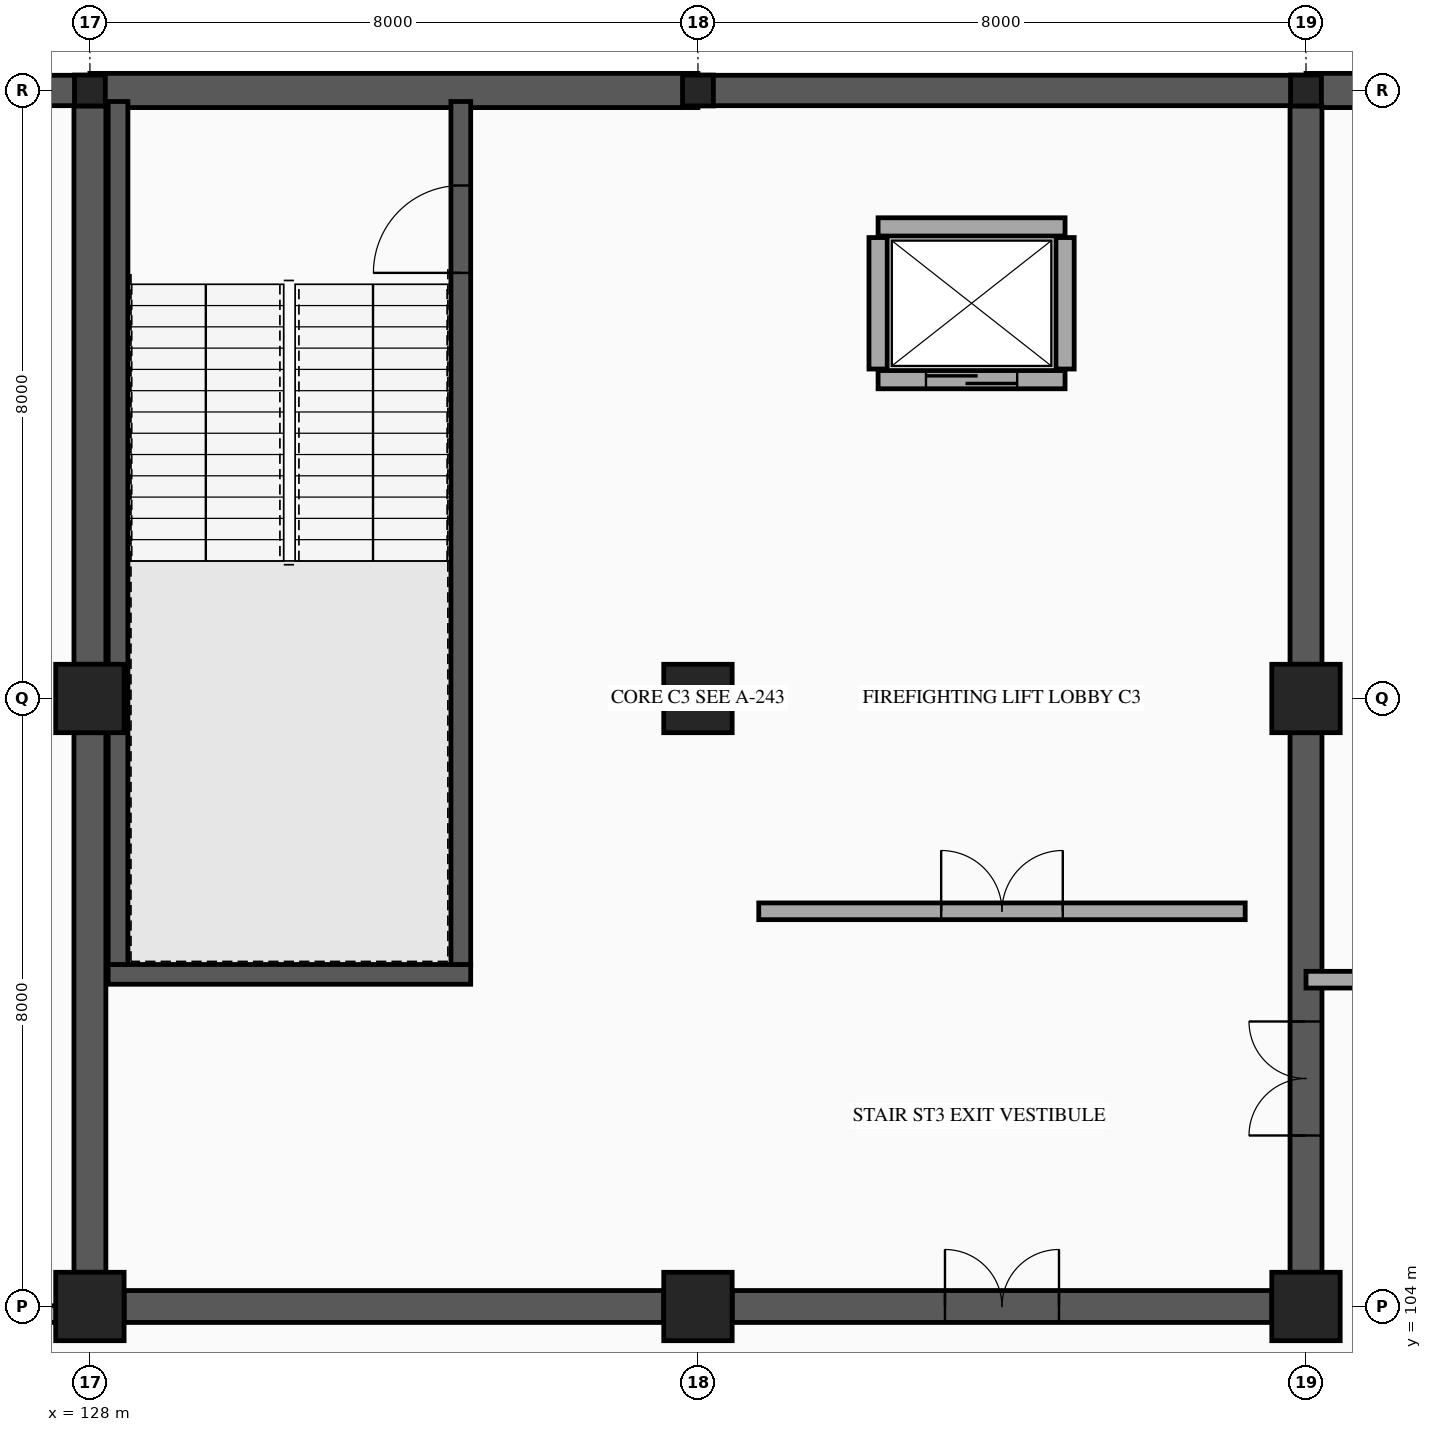
"""IFC4 building model, lengths in metres.
Left out: names, types, materials, properties, quantities, classifications, styles, units other than length and angle.
Written with IfcOpenShell. Run it as: python <this file> out.ifc"""

import sys

from ifc_helpers import new_model, si_unit, direction, frame, frame_2d, origin, origin_2d, place, context, subcontext, project, spatial, rectangle, hollow_rectangle, extrude, element, fill, save


model = new_model("IFC4")
c1 = context("Model", 3, precision=1e-05, world=origin(), true_north=direction((0.0, 1.0)))
c2 = subcontext(c1, "Body", "Model", "MODEL_VIEW")
j1 = project(units=[si_unit("LENGTHUNIT", "METRE"), si_unit("PLANEANGLEUNIT", "RADIAN")], contexts=[c1])
p1 = place(None, origin())
s1 = spatial("IfcSite", under=j1, at=p1, CompositionType="ELEMENT")
p2 = place(p1, origin())
s2 = spatial("IfcBuilding", under=s1, at=p2, CompositionType="ELEMENT")
p3 = place(p2, frame((0.0, 0.0, -4.8)))
s3 = spatial("IfcBuildingStorey", under=s2, at=p3, CompositionType="ELEMENT", Elevation=-4.8)
for number, where, z_axis, x_axis in (
    (1, (128.0, 104.0, 0.0), (0.0, 0.0, 1.0), (1.0, 0.0, 0.0)),
    (2, (128.0, 112.0, 0.0), (0.0, 0.0, 1.0), (1.0, 0.0, 0.0)),
):
    element("IfcColumn", number, at=place(p3, frame(where, z_axis=z_axis, x_axis=x_axis)), inside=s3, PredefinedType="COLUMN", context=c2, shape_type="SweptSolid", body=[
        extrude(rectangle(XDim=0.9, YDim=0.9, at=origin_2d()), origin(), (0.0, 0.0, 1.0), 4.8),
    ])
p4 = place(p3, frame((128.0, 120.0, 0.0), z_axis=(0.0, 0.0, 1.0), x_axis=(1.0, 0.0, 0.0)))
e3 = element("IfcColumn", 3, at=p4, inside=s3, PredefinedType="COLUMN", context=c2, shape_type="SweptSolid", body=[
    extrude(hollow_rectangle(XDim=0.406, YDim=0.406, WallThickness=0.015, InnerFilletRadius=0.015, OuterFilletRadius=0.029, at=origin_2d()), origin(), (0.0, 0.0, 1.0), 4.8),
])
for number, where, z_axis, x_axis in (
    (4, (136.0, 104.0, 0.0), (0.0, 0.0, 1.0), (1.0, 0.0, 0.0)),
    (5, (136.0, 112.0, 0.0), (0.0, 0.0, 1.0), (1.0, 0.0, 0.0)),
):
    element("IfcColumn", number, at=place(p3, frame(where, z_axis=z_axis, x_axis=x_axis)), inside=s3, PredefinedType="COLUMN", context=c2, shape_type="SweptSolid", body=[
        extrude(rectangle(XDim=0.9, YDim=0.9, at=origin_2d()), origin(), (0.0, 0.0, 1.0), 4.8),
    ])
p5 = place(p3, frame((136.0, 120.0, 0.0), z_axis=(0.0, 0.0, 1.0), x_axis=(1.0, 0.0, 0.0)))
e6 = element("IfcColumn", 6, at=p5, inside=s3, PredefinedType="COLUMN", context=c2, shape_type="SweptSolid", body=[
    extrude(hollow_rectangle(XDim=0.406, YDim=0.406, WallThickness=0.015, InnerFilletRadius=0.015, OuterFilletRadius=0.029, at=origin_2d()), origin(), (0.0, 0.0, 1.0), 4.8),
])
for number, where, z_axis, x_axis in (
    (7, (144.0, 104.0, 0.0), (0.0, 0.0, 1.0), (1.0, 0.0, 0.0)),
    (8, (144.0, 112.0, 0.0), (0.0, 0.0, 1.0), (1.0, 0.0, 0.0)),
):
    element("IfcColumn", number, at=place(p3, frame(where, z_axis=z_axis, x_axis=x_axis)), inside=s3, PredefinedType="COLUMN", context=c2, shape_type="SweptSolid", body=[
        extrude(rectangle(XDim=0.9, YDim=0.9, at=origin_2d()), origin(), (0.0, 0.0, 1.0), 4.8),
    ])
p6 = place(p3, frame((144.0, 120.0, 0.0), z_axis=(0.0, 0.0, 1.0), x_axis=(1.0, 0.0, 0.0)))
e9 = element("IfcColumn", 9, at=p6, inside=s3, PredefinedType="COLUMN", context=c2, shape_type="SweptSolid", body=[
    extrude(hollow_rectangle(XDim=0.406, YDim=0.406, WallThickness=0.015, InnerFilletRadius=0.015, OuterFilletRadius=0.029, at=origin_2d()), origin(), (0.0, 0.0, 1.0), 4.8),
])
p7 = place(p3, frame((120.0, 120.0, 0.0), z_axis=(0.0, 0.0, 1.0), x_axis=(1.0, 0.0, 0.0)))
e10 = element("IfcWall", 10, at=p7, inside=s3, PredefinedType="USERDEFINED", context=c2, shape_type="SweptSolid", body=[
    extrude(rectangle(XDim=8.0, YDim=0.4, at=frame_2d((4.0, 0.0))), origin(), (0.0, 0.0, 1.0), 4.5),
])
p8 = place(p3, frame((128.0, 120.0, 0.0), z_axis=(0.0, 0.0, 1.0), x_axis=(1.0, 0.0, 0.0)))
e11 = element("IfcWall", 11, at=p8, inside=s3, PredefinedType="USERDEFINED", context=c2, shape_type="SweptSolid", body=[
    extrude(rectangle(XDim=8.0, YDim=0.45, at=frame_2d((4.0, 0.0))), origin(), (0.0, 0.0, 1.0), 4.5),
])
p9 = place(p3, frame((136.0, 120.0, 0.0), z_axis=(0.0, 0.0, 1.0), x_axis=(1.0, 0.0, 0.0)))
e12 = element("IfcWall", 12, at=p9, inside=s3, PredefinedType="USERDEFINED", context=c2, shape_type="SweptSolid", body=[
    extrude(rectangle(XDim=8.0, YDim=0.4, at=frame_2d((4.0, 0.0))), origin(), (0.0, 0.0, 1.0), 4.5),
])
p10 = place(p3, frame((144.0, 120.0, 0.0), z_axis=(0.0, 0.0, 1.0), x_axis=(1.0, 0.0, 0.0)))
e13 = element("IfcWall", 13, at=p10, inside=s3, PredefinedType="USERDEFINED", context=c2, shape_type="SweptSolid", body=[
    extrude(rectangle(XDim=8.0, YDim=0.45, at=frame_2d((4.0, 0.0))), origin(), (0.0, 0.0, 1.0), 4.5),
])
p11 = place(p3, frame((128.24, 108.37, 0.0), z_axis=(0.0, 0.0, 1.0), x_axis=(1.0, 0.0, 0.0)))
e14 = element("IfcWall", 14, at=p11, inside=s3, PredefinedType="SHEAR", context=c2, shape_type="SweptSolid", body=[
    extrude(rectangle(XDim=4.77, YDim=0.26, at=frame_2d((2.385, 0.0))), origin(), (0.0, 0.0, 1.0), 4.58),
])
p12 = place(p3, frame((128.37, 108.5, 0.0), z_axis=(0.0, 0.0, 1.0), x_axis=(0.0, 1.0, 0.0)))
e15 = element("IfcWall", 15, at=p12, inside=s3, PredefinedType="SHEAR", context=c2, shape_type="SweptSolid", body=[
    extrude(rectangle(XDim=11.355, YDim=0.26, at=frame_2d((5.677, 0.0))), origin(), (0.0, 0.0, 1.0), 4.58),
])
p13 = place(p3, frame((132.88, 108.5, 0.0), z_axis=(0.0, 0.0, 1.0), x_axis=(0.0, 1.0, 0.0)))
e16 = element("IfcWall", 16, at=p13, inside=s3, PredefinedType="SHEAR", context=c2, shape_type="SweptSolid", body=[
    extrude(rectangle(XDim=11.355, YDim=0.26, at=frame_2d((5.677, 0.0))), origin(), (0.0, 0.0, 1.0), 4.58),
])
p14 = place(p13, frame((9.1, 0.0, 0.0)))
e17 = element("IfcOpeningElement", 17, at=p14, cuts=e16, PredefinedType="OPENING", context=c2, shape_type="SweptSolid", body=[
    extrude(rectangle(XDim=1.15, YDim=2.15, at=frame_2d((0.575, 1.075))), frame((0.0, 0.14, 0.0), z_axis=(0.0, -1.0, 0.0), x_axis=(1.0, 0.0, 0.0)), (0.0, 0.0, 1.0), 0.28),
])
p15 = place(p3, frame((128.45, 104.0, 0.0), z_axis=(0.0, 0.0, 1.0), x_axis=(1.0, 0.0, 0.0)))
e18 = element("IfcWall", 18, at=p15, inside=s3, PredefinedType="SHEAR", context=c2, shape_type="SweptSolid", body=[
    extrude(rectangle(XDim=7.1, YDim=0.42, at=frame_2d((3.55, 0.0))), origin(), (0.0, 0.0, 1.0), 4.58),
])
p16 = place(p3, frame((136.45, 104.0, 0.0), z_axis=(0.0, 0.0, 1.0), x_axis=(1.0, 0.0, 0.0)))
e19 = element("IfcWall", 19, at=p16, inside=s3, PredefinedType="SHEAR", context=c2, shape_type="SweptSolid", body=[
    extrude(rectangle(XDim=7.1, YDim=0.42, at=frame_2d((3.55, 0.0))), origin(), (0.0, 0.0, 1.0), 4.58),
])
p17 = place(p16, frame((2.8, 0.0, 0.0)))
e20 = element("IfcOpeningElement", 20, at=p17, cuts=e19, PredefinedType="OPENING", context=c2, shape_type="SweptSolid", body=[
    extrude(rectangle(XDim=1.5, YDim=2.15, at=frame_2d((0.75, 1.075))), frame((0.0, 0.22, 0.0), z_axis=(0.0, -1.0, 0.0), x_axis=(1.0, 0.0, 0.0)), (0.0, 0.0, 1.0), 0.44),
])
p18 = place(p3, frame((128.0, 104.45, 0.0), z_axis=(0.0, 0.0, 1.0), x_axis=(0.0, 1.0, 0.0)))
e21 = element("IfcWall", 21, at=p18, inside=s3, PredefinedType="SHEAR", context=c2, shape_type="SweptSolid", body=[
    extrude(rectangle(XDim=7.1, YDim=0.42, at=frame_2d((3.55, 0.0))), origin(), (0.0, 0.0, 1.0), 4.58),
])
p19 = place(p3, frame((128.0, 112.45, 0.0), z_axis=(0.0, 0.0, 1.0), x_axis=(0.0, 1.0, 0.0)))
e22 = element("IfcWall", 22, at=p19, inside=s3, PredefinedType="SHEAR", context=c2, shape_type="SweptSolid", body=[
    extrude(rectangle(XDim=7.347, YDim=0.42, at=frame_2d((3.674, 0.0))), origin(), (0.0, 0.0, 1.0), 4.58),
])
p20 = place(p3, frame((144.0, 104.45, 0.0), z_axis=(0.0, 0.0, 1.0), x_axis=(0.0, 1.0, 0.0)))
e23 = element("IfcWall", 23, at=p20, inside=s3, PredefinedType="SHEAR", context=c2, shape_type="SweptSolid", body=[
    extrude(rectangle(XDim=7.1, YDim=0.42, at=frame_2d((3.55, 0.0))), origin(), (0.0, 0.0, 1.0), 4.58),
])
p21 = place(p20, frame((1.8, 0.0, 0.0)))
e24 = element("IfcOpeningElement", 24, at=p21, cuts=e23, PredefinedType="OPENING", context=c2, shape_type="SweptSolid", body=[
    extrude(rectangle(XDim=1.5, YDim=2.15, at=frame_2d((0.75, 1.075))), frame((0.0, 0.22, 0.0), z_axis=(0.0, -1.0, 0.0), x_axis=(1.0, 0.0, 0.0)), (0.0, 0.0, 1.0), 0.44),
])
p22 = place(p3, frame((144.0, 112.45, 0.0), z_axis=(0.0, 0.0, 1.0), x_axis=(0.0, 1.0, 0.0)))
e25 = element("IfcWall", 25, at=p22, inside=s3, PredefinedType="SHEAR", context=c2, shape_type="SweptSolid", body=[
    extrude(rectangle(XDim=7.347, YDim=0.42, at=frame_2d((3.674, 0.0))), origin(), (0.0, 0.0, 1.0), 4.58),
])
p23 = place(p3, frame((138.37, 116.195, 0.0), z_axis=(0.0, 0.0, 1.0), x_axis=(1.0, 0.0, 0.0)))
e26 = element("IfcWall", 26, at=p23, inside=s3, PredefinedType="PARTITIONING", context=c2, shape_type="SweptSolid", body=[
    extrude(rectangle(XDim=2.46, YDim=0.24, at=frame_2d((1.23, 0.0))), origin(), (0.0, 0.0, 1.0), 4.58),
])
p24 = place(p23, frame((0.63, 0.0, 0.0)))
e27 = element("IfcOpeningElement", 27, at=p24, cuts=e26, PredefinedType="OPENING", context=c2, shape_type="SweptSolid", body=[
    extrude(rectangle(XDim=1.2, YDim=2.15, at=frame_2d((0.6, 1.075))), frame((0.0, 0.13, 0.0), z_axis=(0.0, -1.0, 0.0), x_axis=(1.0, 0.0, 0.0)), (0.0, 0.0, 1.0), 0.26),
])
p25 = place(p3, frame((138.37, 118.205, 0.0), z_axis=(0.0, 0.0, 1.0), x_axis=(1.0, 0.0, 0.0)))
e28 = element("IfcWall", 28, at=p25, inside=s3, PredefinedType="PARTITIONING", context=c2, shape_type="SweptSolid", body=[
    extrude(rectangle(XDim=2.46, YDim=0.24, at=frame_2d((1.23, 0.0))), origin(), (0.0, 0.0, 1.0), 4.58),
])
for number, where, z_axis, x_axis in (
    (29, (138.37, 116.335, 0.0), (0.0, 0.0, 1.0), (0.0, 1.0, 0.0)),
    (30, (140.83, 116.335, 0.0), (0.0, 0.0, 1.0), (0.0, 1.0, 0.0)),
):
    element("IfcWall", number, at=place(p3, frame(where, z_axis=z_axis, x_axis=x_axis)), inside=s3, PredefinedType="PARTITIONING", context=c2, shape_type="SweptSolid", body=[
        extrude(rectangle(XDim=1.73, YDim=0.24, at=frame_2d((0.865, 0.0))), origin(), (0.0, 0.0, 1.0), 4.58),
    ])
p26 = place(p3, frame((136.8, 109.2, 0.0), z_axis=(0.0, 0.0, 1.0), x_axis=(1.0, 0.0, 0.0)))
e31 = element("IfcWall", 31, at=p26, inside=s3, PredefinedType="PARTITIONING", context=c2, shape_type="SweptSolid", body=[
    extrude(rectangle(XDim=6.4, YDim=0.22, at=frame_2d((3.2, 0.0))), origin(), (0.0, 0.0, 1.0), 3.78),
])
p27 = place(p26, frame((2.4, 0.0, 0.0)))
e32 = element("IfcOpeningElement", 32, at=p27, cuts=e31, PredefinedType="OPENING", context=c2, shape_type="SweptSolid", body=[
    extrude(rectangle(XDim=1.6, YDim=2.15, at=frame_2d((0.8, 1.075))), frame((0.0, 0.12, 0.0), z_axis=(0.0, -1.0, 0.0), x_axis=(1.0, 0.0, 0.0)), (0.0, 0.0, 1.0), 0.24),
])
p28 = place(p3, frame((96.5, 103.9, 0.0), z_axis=(0.0, 0.0, 1.0), x_axis=(1.0, 0.0, 0.0)))
e33 = element("IfcWall", 33, at=p28, inside=s3, PredefinedType="PARTITIONING", context=c2, shape_type="SweptSolid", body=[
    extrude(rectangle(XDim=31.5, YDim=0.22, at=frame_2d((15.75, 0.0))), origin(), (0.0, 0.0, 1.0), 3.78),
])
p29 = place(p3, frame((144.0, 108.3, 0.0), z_axis=(0.0, 0.0, 1.0), x_axis=(1.0, 0.0, 0.0)))
e34 = element("IfcWall", 34, at=p29, inside=s3, PredefinedType="PARTITIONING", context=c2, shape_type="SweptSolid", body=[
    extrude(rectangle(XDim=31.85, YDim=0.22, at=frame_2d((15.925, 0.0))), origin(), (0.0, 0.0, 1.0), 3.78),
])
p30 = place(p29, frame((27.774, 0.0, 0.0)))
e35 = element("IfcOpeningElement", 35, at=p30, cuts=e34, PredefinedType="OPENING", context=c2, shape_type="SweptSolid", body=[
    extrude(rectangle(XDim=1.05, YDim=2.15, at=frame_2d((0.525, 1.075))), frame((0.0, 0.12, 0.0), z_axis=(0.0, -1.0, 0.0), x_axis=(1.0, 0.0, 0.0)), (0.0, 0.0, 1.0), 0.24),
])
p31 = place(p14, origin())
e36 = element("IfcDoor", 36, at=p31, inside=s3, OperationType="SINGLE_SWING_LEFT", PredefinedType="DOOR", context=c2, shape_type="SweptSolid", body=[
    extrude(rectangle(XDim=1.15, YDim=2.15, at=frame_2d((0.575, 1.075))), frame((0.0, 0.025, 0.0), z_axis=(0.0, -1.0, 0.0), x_axis=(1.0, 0.0, 0.0)), (0.0, 0.0, 1.0), 0.05),
])
fill(e17, e36)
p32 = place(p17, origin())
e37 = element("IfcDoor", 37, at=p32, inside=s3, OperationType="DOUBLE_DOOR_SINGLE_SWING", PredefinedType="DOOR", context=c2, shape_type="SweptSolid", body=[
    extrude(rectangle(XDim=1.5, YDim=2.15, at=frame_2d((0.75, 1.075))), frame((0.0, 0.025, 0.0), z_axis=(0.0, -1.0, 0.0), x_axis=(1.0, 0.0, 0.0)), (0.0, 0.0, 1.0), 0.05),
])
fill(e20, e37)
p33 = place(p21, origin())
e38 = element("IfcDoor", 38, at=p33, inside=s3, OperationType="DOUBLE_DOOR_SINGLE_SWING", PredefinedType="DOOR", context=c2, shape_type="SweptSolid", body=[
    extrude(rectangle(XDim=1.5, YDim=2.15, at=frame_2d((0.75, 1.075))), frame((0.0, 0.025, 0.0), z_axis=(0.0, -1.0, 0.0), x_axis=(1.0, 0.0, 0.0)), (0.0, 0.0, 1.0), 0.05),
])
fill(e24, e38)
p34 = place(p24, origin())
e39 = element("IfcDoor", 39, at=p34, inside=s3, OperationType="SLIDING_TO_LEFT", PredefinedType="DOOR", context=c2, shape_type="SweptSolid", body=[
    extrude(rectangle(XDim=1.2, YDim=2.15, at=frame_2d((0.6, 1.075))), frame((0.0, 0.025, 0.0), z_axis=(0.0, -1.0, 0.0), x_axis=(1.0, 0.0, 0.0)), (0.0, 0.0, 1.0), 0.05),
])
fill(e27, e39)
p35 = place(p27, origin())
e40 = element("IfcDoor", 40, at=p35, inside=s3, OperationType="DOUBLE_DOOR_SINGLE_SWING", PredefinedType="DOOR", context=c2, shape_type="SweptSolid", body=[
    extrude(rectangle(XDim=1.6, YDim=2.15, at=frame_2d((0.8, 1.075))), frame((0.0, 0.025, 0.0), z_axis=(0.0, -1.0, 0.0), x_axis=(1.0, 0.0, 0.0)), (0.0, 0.0, 1.0), 0.05),
])
fill(e32, e40)
save(model, sys.argv[1])
